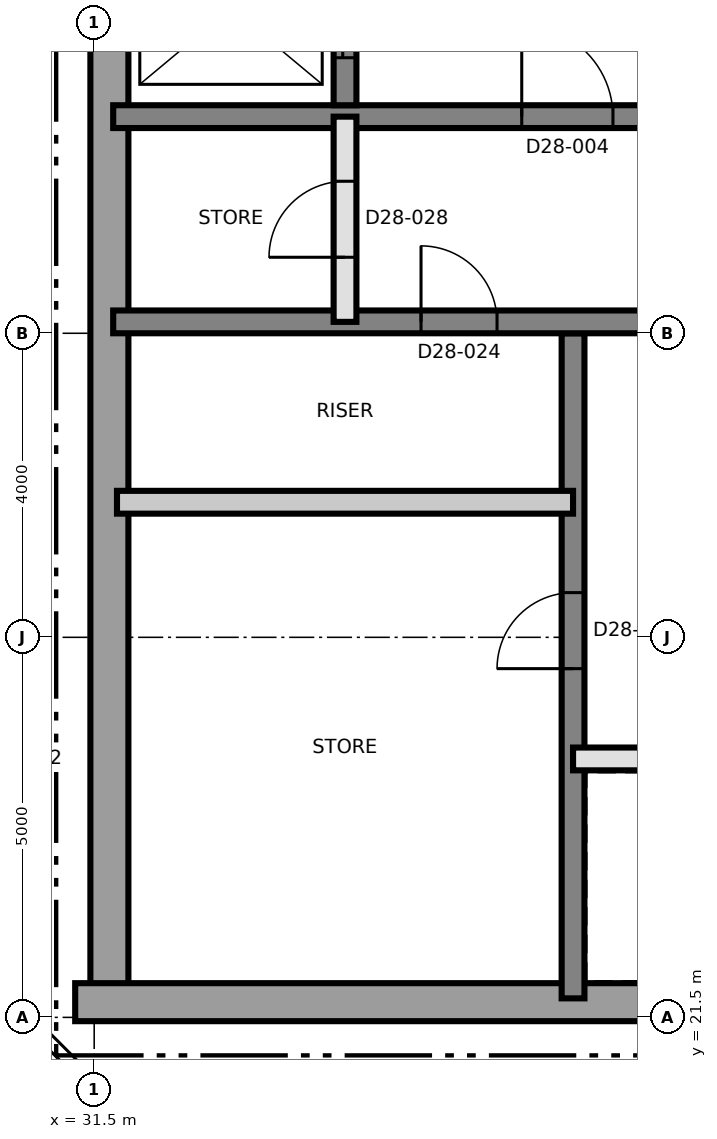
"""IFC4 building model, lengths in metres.
Left out: names, types, materials, properties, quantities, classifications, styles, units other than length and angle.
Written with IfcOpenShell. Run it as: python <this file> out.ifc"""

import sys

from ifc_helpers import new_model, si_unit, direction, frame, frame_2d, origin, place, context, subcontext, project, spatial, rectangle, extrude, element, fill, save


model = new_model("IFC4")
c1 = context("Model", 3, precision=1e-05, world=origin(), true_north=direction((0.0, 1.0)))
c2 = subcontext(c1, "Body", "Model", "MODEL_VIEW")
j1 = project(units=[si_unit("LENGTHUNIT", "METRE"), si_unit("PLANEANGLEUNIT", "RADIAN")], contexts=[c1])
p1 = place(None, origin())
s1 = spatial("IfcSite", under=j1, at=p1, CompositionType="ELEMENT")
p2 = place(p1, origin())
s2 = spatial("IfcBuilding", under=s1, at=p2, CompositionType="ELEMENT")
p3 = place(p2, frame((0.0, 0.0, 249.4)))
s3 = spatial("IfcBuildingStorey", under=s2, at=p3, CompositionType="ELEMENT", Elevation=249.4)
p4 = place(p3, frame((31.7, 21.75, 0.0), z_axis=(0.0, 0.0, 1.0), x_axis=(0.0, 1.0, 0.0)))
e1 = element("IfcWall", 1, at=p4, inside=s3, PredefinedType="SHEAR", context=c2, shape_type="SweptSolid", body=[
    extrude(rectangle(XDim=17.5, YDim=0.5, at=frame_2d((8.75, 0.0))), origin(), (0.0, 0.0, 1.0), 5.5),
])
p5 = place(p3, frame((31.25, 21.7, 0.0), z_axis=(0.0, 0.0, 1.0), x_axis=(1.0, 0.0, 0.0)))
e2 = element("IfcWall", 2, at=p5, inside=s3, PredefinedType="SHEAR", context=c2, shape_type="SweptSolid", body=[
    extrude(rectangle(XDim=27.0, YDim=0.5, at=frame_2d((13.5, 0.0))), origin(), (0.0, 0.0, 1.0), 5.5),
])
p6 = place(p3, frame((37.8, 21.75, 0.0), z_axis=(0.0, 0.0, 1.0), x_axis=(0.0, 1.0, 0.0)))
e3 = element("IfcWall", 3, at=p6, inside=s3, PredefinedType="SHEAR", context=c2, shape_type="SweptSolid", body=[
    extrude(rectangle(XDim=8.75, YDim=0.3, at=frame_2d((4.375, 0.0))), origin(), (0.0, 0.0, 1.0), 5.5),
])
p7 = place(p6, frame((4.338, 0.0, 0.0)))
e4 = element("IfcOpeningElement", 4, at=p7, cuts=e3, PredefinedType="OPENING", context=c2, shape_type="SweptSolid", body=[
    extrude(rectangle(XDim=1.0, YDim=2.1, at=frame_2d((0.5, 1.05))), frame((0.0, 0.16, 0.0), z_axis=(0.0, -1.0, 0.0), x_axis=(1.0, 0.0, 0.0)), (0.0, 0.0, 1.0), 0.32),
])
p8 = place(p3, frame((31.75, 30.65, 0.0), z_axis=(0.0, 0.0, 1.0), x_axis=(1.0, 0.0, 0.0)))
e5 = element("IfcWall", 5, at=p8, inside=s3, PredefinedType="SHEAR", context=c2, shape_type="SweptSolid", body=[
    extrude(rectangle(XDim=26.5, YDim=0.3, at=frame_2d((13.25, 0.0))), origin(), (0.0, 0.0, 1.0), 5.5),
])
p9 = place(p8, frame((24.75, 0.0, 0.0)))
e6 = element("IfcOpeningElement", 6, at=p9, cuts=e5, PredefinedType="OPENING", context=c2, shape_type="SweptSolid", body=[
    extrude(rectangle(XDim=1.0, YDim=2.1, at=frame_2d((0.5, 1.05))), frame((0.0, 0.16, 0.0), z_axis=(0.0, -1.0, 0.0), x_axis=(1.0, 0.0, 0.0)), (0.0, 0.0, 1.0), 0.32),
])
p10 = place(p8, frame((4.05, 0.0, 0.0)))
e7 = element("IfcOpeningElement", 7, at=p10, cuts=e5, PredefinedType="OPENING", context=c2, shape_type="SweptSolid", body=[
    extrude(rectangle(XDim=1.0, YDim=2.1, at=frame_2d((0.5, 1.05))), frame((0.0, 0.16, 0.0), z_axis=(0.0, -1.0, 0.0), x_axis=(1.0, 0.0, 0.0)), (0.0, 0.0, 1.0), 0.32),
])
p11 = place(p3, frame((31.75, 33.35, 0.0), z_axis=(0.0, 0.0, 1.0), x_axis=(1.0, 0.0, 0.0)))
e8 = element("IfcWall", 8, at=p11, inside=s3, PredefinedType="SHEAR", context=c2, shape_type="SweptSolid", body=[
    extrude(rectangle(XDim=26.5, YDim=0.3, at=frame_2d((13.25, 0.0))), origin(), (0.0, 0.0, 1.0), 5.5),
])
p12 = place(p11, frame((13.9, 0.0, 0.0)))
e9 = element("IfcOpeningElement", 9, at=p12, cuts=e8, PredefinedType="OPENING", context=c2, shape_type="SweptSolid", body=[
    extrude(rectangle(XDim=1.4, YDim=2.1, at=frame_2d((0.7, 1.05))), frame((0.0, 0.16, 0.0), z_axis=(0.0, -1.0, 0.0), x_axis=(1.0, 0.0, 0.0)), (0.0, 0.0, 1.0), 0.32),
])
p13 = place(p11, frame((5.375, 0.0, 0.0)))
e10 = element("IfcOpeningElement", 10, at=p13, cuts=e8, PredefinedType="OPENING", context=c2, shape_type="SweptSolid", body=[
    extrude(rectangle(XDim=1.2, YDim=2.1, at=frame_2d((0.6, 1.05))), frame((0.0, 0.16, 0.0), z_axis=(0.0, -1.0, 0.0), x_axis=(1.0, 0.0, 0.0)), (0.0, 0.0, 1.0), 0.32),
])
p14 = place(p11, frame((19.925, 0.0, 0.0)))
e11 = element("IfcOpeningElement", 11, at=p14, cuts=e8, PredefinedType="OPENING", context=c2, shape_type="SweptSolid", body=[
    extrude(rectangle(XDim=1.2, YDim=2.1, at=frame_2d((0.6, 1.05))), frame((0.0, 0.16, 0.0), z_axis=(0.0, -1.0, 0.0), x_axis=(1.0, 0.0, 0.0)), (0.0, 0.0, 1.0), 0.32),
])
p15 = place(p3, frame((34.8, 33.5, 0.0), z_axis=(0.0, 0.0, 1.0), x_axis=(0.0, 1.0, 0.0)))
e12 = element("IfcWall", 12, at=p15, inside=s3, PredefinedType="SHEAR", context=c2, shape_type="SweptSolid", body=[
    extrude(rectangle(XDim=2.55, YDim=0.3, at=frame_2d((1.275, 0.0))), origin(), (0.0, 0.0, 1.0), 5.5),
])
p16 = place(p15, frame((0.625, 0.0, 0.0)))
e13 = element("IfcOpeningElement", 13, at=p16, cuts=e12, PredefinedType="OPENING", context=c2, shape_type="SweptSolid", body=[
    extrude(rectangle(XDim=1.3, YDim=2.4, at=frame_2d((0.65, 1.2))), frame((0.0, 0.16, 0.0), z_axis=(0.0, -1.0, 0.0), x_axis=(1.0, 0.0, 0.0)), (0.0, 0.0, 1.0), 0.32),
])
p17 = place(p3, frame((37.8, 24.9, 0.0), z_axis=(0.0, 0.0, 1.0), x_axis=(1.0, 0.0, 0.0)))
e14 = element("IfcWall", 14, at=p17, inside=s3, PredefinedType="SOLIDWALL", context=c2, shape_type="SweptSolid", body=[
    extrude(rectangle(XDim=18.0, YDim=0.3, at=frame_2d((9.0, 0.0))), origin(), (0.0, 0.0, 1.0), 5.2),
])
p18 = place(p17, frame((1.05, 0.0, 0.0)))
e15 = element("IfcOpeningElement", 15, at=p18, cuts=e14, PredefinedType="OPENING", context=c2, shape_type="SweptSolid", body=[
    extrude(rectangle(XDim=0.9, YDim=2.1, at=frame_2d((0.45, 1.05))), frame((0.0, 0.16, 0.0), z_axis=(0.0, -1.0, 0.0), x_axis=(1.0, 0.0, 0.0)), (0.0, 0.0, 1.0), 0.32),
])
p19 = place(p17, frame((10.05, 0.0, 0.0)))
e16 = element("IfcOpeningElement", 16, at=p19, cuts=e14, PredefinedType="OPENING", context=c2, shape_type="SweptSolid", body=[
    extrude(rectangle(XDim=0.9, YDim=2.1, at=frame_2d((0.45, 1.05))), frame((0.0, 0.16, 0.0), z_axis=(0.0, -1.0, 0.0), x_axis=(1.0, 0.0, 0.0)), (0.0, 0.0, 1.0), 0.32),
])
p20 = place(p17, frame((3.95, 0.0, 0.0)))
e17 = element("IfcOpeningElement", 17, at=p20, cuts=e14, PredefinedType="OPENING", context=c2, shape_type="SweptSolid", body=[
    extrude(rectangle(XDim=1.1, YDim=2.4, at=frame_2d((0.55, 1.2))), frame((0.0, 0.16, 0.0), z_axis=(0.0, -1.0, 0.0), x_axis=(1.0, 0.0, 0.0)), (0.0, 0.0, 1.0), 0.32),
])
p21 = place(p17, frame((6.95, 0.0, 0.0)))
e18 = element("IfcOpeningElement", 18, at=p21, cuts=e14, PredefinedType="OPENING", context=c2, shape_type="SweptSolid", body=[
    extrude(rectangle(XDim=1.1, YDim=2.4, at=frame_2d((0.55, 1.2))), frame((0.0, 0.16, 0.0), z_axis=(0.0, -1.0, 0.0), x_axis=(1.0, 0.0, 0.0)), (0.0, 0.0, 1.0), 0.32),
])
p22 = place(p17, frame((13.0, 0.0, 0.0)))
e19 = element("IfcOpeningElement", 19, at=p22, cuts=e14, PredefinedType="OPENING", context=c2, shape_type="SweptSolid", body=[
    extrude(rectangle(XDim=1.0, YDim=2.1, at=frame_2d((0.5, 1.05))), frame((0.0, 0.16, 0.0), z_axis=(0.0, -1.0, 0.0), x_axis=(1.0, 0.0, 0.0)), (0.0, 0.0, 1.0), 0.32),
])
p23 = place(p17, frame((16.0, 0.0, 0.0)))
e20 = element("IfcOpeningElement", 20, at=p23, cuts=e14, PredefinedType="OPENING", context=c2, shape_type="SweptSolid", body=[
    extrude(rectangle(XDim=1.0, YDim=2.1, at=frame_2d((0.5, 1.05))), frame((0.0, 0.16, 0.0), z_axis=(0.0, -1.0, 0.0), x_axis=(1.0, 0.0, 0.0)), (0.0, 0.0, 1.0), 0.32),
])
p24 = place(p3, frame((31.8, 28.277, 0.0), z_axis=(0.0, 0.0, 1.0), x_axis=(1.0, 0.0, 0.0)))
e21 = element("IfcWall", 21, at=p24, inside=s3, PredefinedType="PARTITIONING", context=c2, shape_type="SweptSolid", body=[
    extrude(rectangle(XDim=6.0, YDim=0.3, at=frame_2d((3.0, 0.0))), origin(), (0.0, 0.0, 1.0), 5.2),
])
p25 = place(p3, frame((34.8, 30.65, 0.0), z_axis=(0.0, 0.0, 1.0), x_axis=(0.0, 1.0, 0.0)))
e22 = element("IfcWall", 22, at=p25, inside=s3, PredefinedType="SOLIDWALL", context=c2, shape_type="SweptSolid", body=[
    extrude(rectangle(XDim=2.7, YDim=0.3, at=frame_2d((1.35, 0.0))), origin(), (0.0, 0.0, 1.0), 5.2),
])
p26 = place(p25, frame((0.85, 0.0, 0.0)))
e23 = element("IfcOpeningElement", 23, at=p26, cuts=e22, PredefinedType="OPENING", context=c2, shape_type="SweptSolid", body=[
    extrude(rectangle(XDim=1.0, YDim=2.1, at=frame_2d((0.5, 1.05))), frame((0.0, 0.16, 0.0), z_axis=(0.0, -1.0, 0.0), x_axis=(1.0, 0.0, 0.0)), (0.0, 0.0, 1.0), 0.32),
])
p27 = place(p13, origin())
e24 = element("IfcDoor", 24, at=p27, inside=s3, OperationType="SINGLE_SWING_LEFT", PredefinedType="DOOR", context=c2, shape_type="SweptSolid", body=[
    extrude(rectangle(XDim=1.2, YDim=2.1, at=frame_2d((0.6, 1.05))), frame((0.0, 0.025, 0.0), z_axis=(0.0, -1.0, 0.0), x_axis=(1.0, 0.0, 0.0)), (0.0, 0.0, 1.0), 0.05),
])
fill(e10, e24)
p28 = place(p16, origin())
e25 = element("IfcDoor", 25, at=p28, inside=s3, OperationType="SLIDING_TO_LEFT", PredefinedType="DOOR", context=c2, shape_type="SweptSolid", body=[
    extrude(rectangle(XDim=1.3, YDim=2.4, at=frame_2d((0.65, 1.2))), frame((0.0, 0.025, 0.0), z_axis=(0.0, -1.0, 0.0), x_axis=(1.0, 0.0, 0.0)), (0.0, 0.0, 1.0), 0.05),
])
fill(e13, e25)
p29 = place(p10, origin())
e26 = element("IfcDoor", 26, at=p29, inside=s3, OperationType="SINGLE_SWING_LEFT", PredefinedType="DOOR", context=c2, shape_type="SweptSolid", body=[
    extrude(rectangle(XDim=1.0, YDim=2.1, at=frame_2d((0.5, 1.05))), frame((0.0, 0.025, 0.0), z_axis=(0.0, -1.0, 0.0), x_axis=(1.0, 0.0, 0.0)), (0.0, 0.0, 1.0), 0.05),
])
fill(e7, e26)
p30 = place(p7, origin())
e27 = element("IfcDoor", 27, at=p30, inside=s3, OperationType="SINGLE_SWING_RIGHT", PredefinedType="DOOR", context=c2, shape_type="SweptSolid", body=[
    extrude(rectangle(XDim=1.0, YDim=2.1, at=frame_2d((0.5, 1.05))), frame((0.0, 0.025, 0.0), z_axis=(0.0, -1.0, 0.0), x_axis=(1.0, 0.0, 0.0)), (0.0, 0.0, 1.0), 0.05),
])
fill(e4, e27)
p31 = place(p26, origin())
e28 = element("IfcDoor", 28, at=p31, inside=s3, OperationType="SINGLE_SWING_LEFT", PredefinedType="DOOR", context=c2, shape_type="SweptSolid", body=[
    extrude(rectangle(XDim=1.0, YDim=2.1, at=frame_2d((0.5, 1.05))), frame((0.0, 0.025, 0.0), z_axis=(0.0, -1.0, 0.0), x_axis=(1.0, 0.0, 0.0)), (0.0, 0.0, 1.0), 0.05),
])
fill(e23, e28)
save(model, sys.argv[1])
